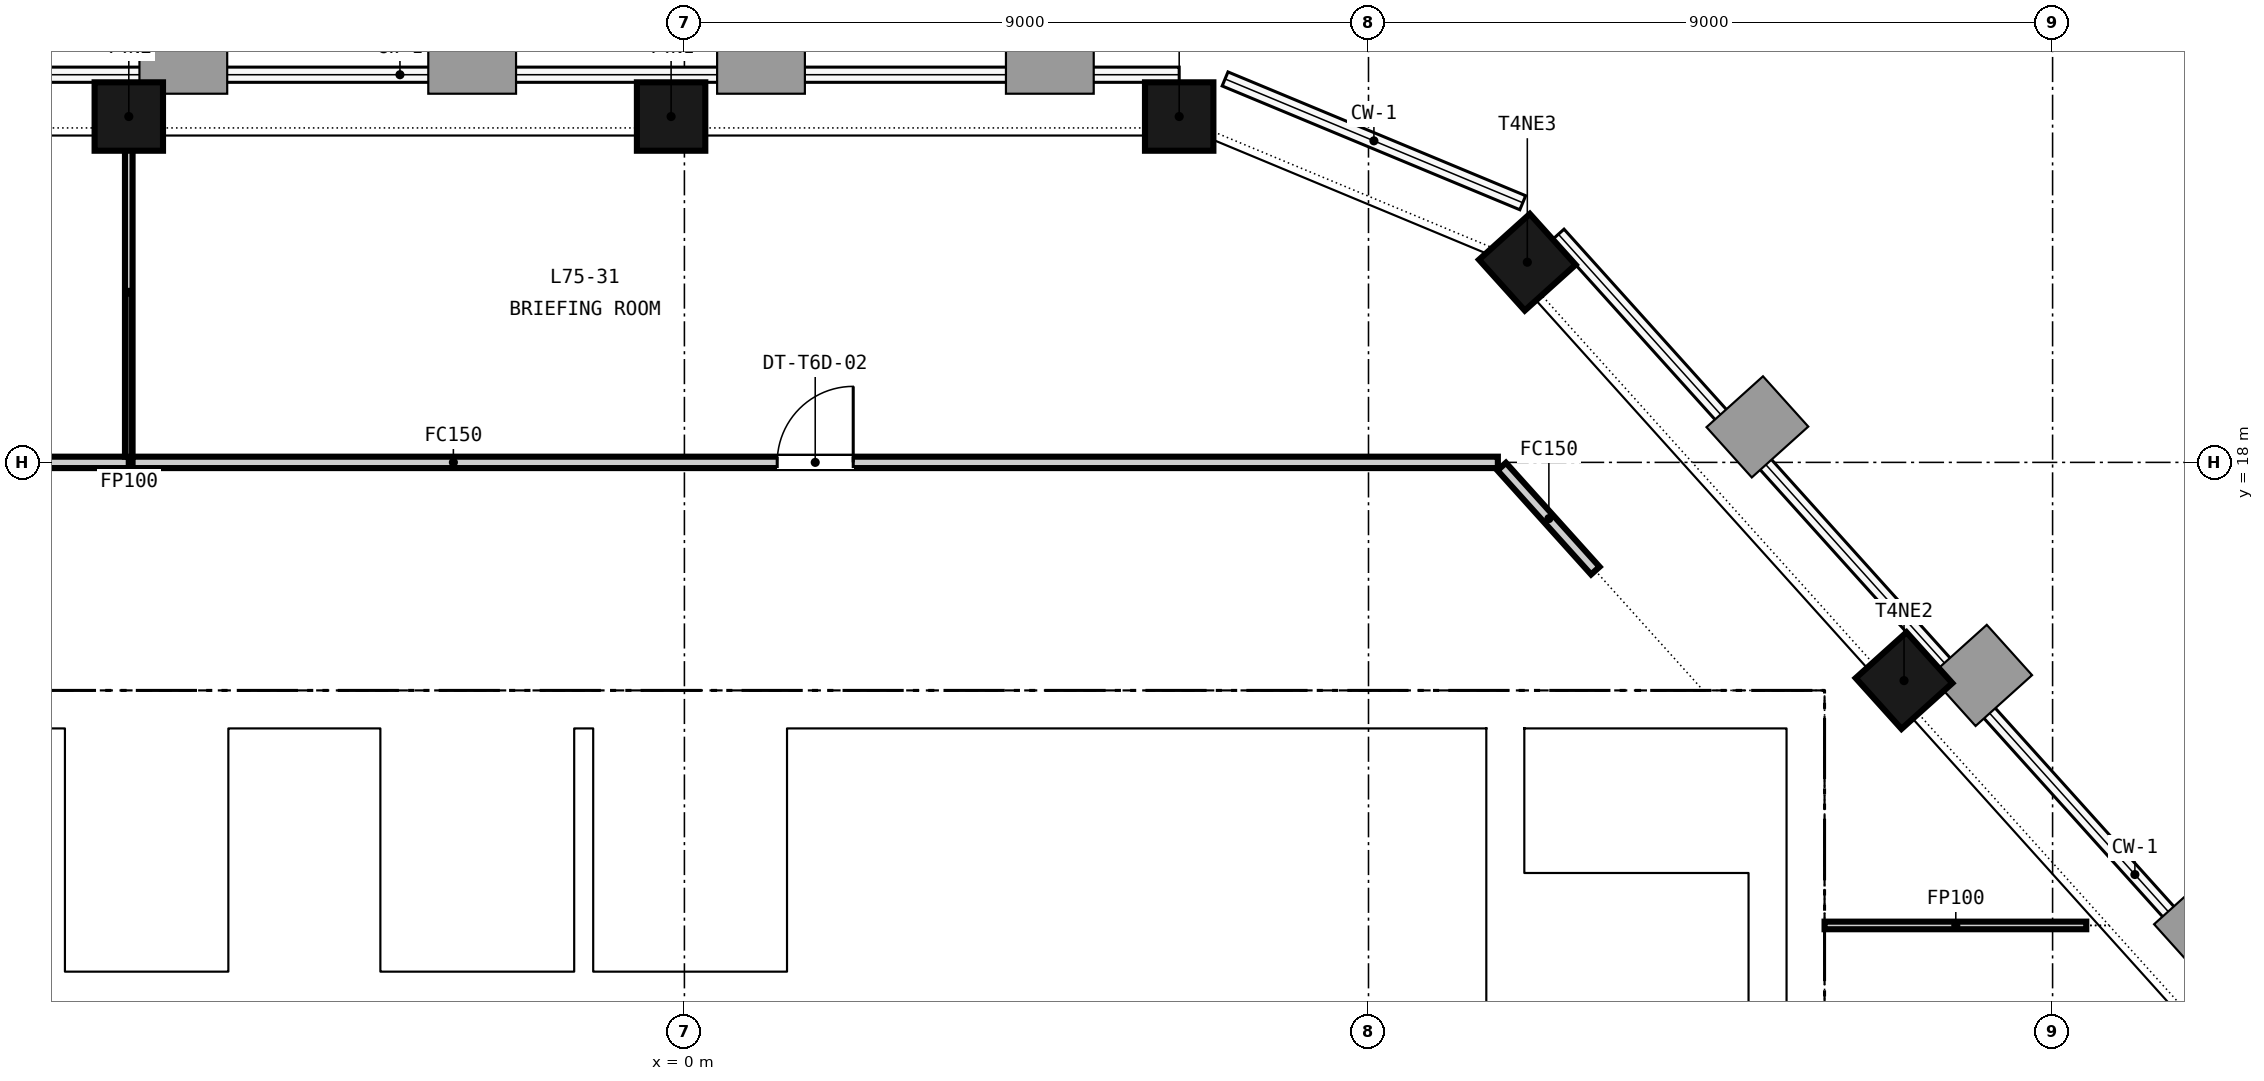
"""IFC4 building model, lengths in metres.
Left out: names, types, materials, properties, quantities, classifications, styles, units other than length and angle.
Written with IfcOpenShell. Run it as: python <this file> out.ifc"""

import sys

from ifc_helpers import new_model, si_unit, direction, frame, frame_2d, origin, origin_2d, place, context, subcontext, project, spatial, rectangle, extrude, element, fill, save


model = new_model("IFC4")
c1 = context("Model", 3, precision=1e-05, world=origin(), true_north=direction((0.0, 1.0)))
c2 = subcontext(c1, "Body", "Model", "MODEL_VIEW")
j1 = project(units=[si_unit("LENGTHUNIT", "METRE"), si_unit("PLANEANGLEUNIT", "RADIAN")], contexts=[c1])
p1 = place(None, origin())
s1 = spatial("IfcSite", under=j1, at=p1, CompositionType="ELEMENT")
p2 = place(p1, origin())
s2 = spatial("IfcBuilding", under=s1, at=p2, CompositionType="ELEMENT")
p3 = place(p2, frame((0.0, 0.0, 293.8)))
s3 = spatial("IfcBuildingStorey", under=s2, at=p3, CompositionType="ELEMENT", Elevation=293.8)
p4 = place(p3, frame((-15.0, 14.75, -0.15), z_axis=(0.0, 0.0, 1.0), x_axis=(1.0, 0.0, 0.0)))
e1 = element("IfcWall", 1, at=p4, inside=s3, PredefinedType="SOLIDWALL", context=c2, shape_type="SweptSolid", body=[
    extrude(rectangle(XDim=30.0, YDim=0.5, at=frame_2d((15.0, 0.0))), origin(), (0.0, 0.0, 1.0), 3.65),
])
p5 = place(p4, frame((9.25, 0.0, 0.15)))
e2 = element("IfcOpeningElement", 2, at=p5, cuts=e1, PredefinedType="OPENING", context=c2, shape_type="SweptSolid", body=[
    extrude(rectangle(XDim=1.5, YDim=2.1, at=frame_2d((0.75, 1.05))), frame((0.0, 0.26, 0.0), z_axis=(0.0, -1.0, 0.0), x_axis=(1.0, 0.0, 0.0)), (0.0, 0.0, 1.0), 0.52),
])
p6 = place(p4, frame((19.4, 0.0, 0.15)))
e3 = element("IfcOpeningElement", 3, at=p6, cuts=e1, PredefinedType="OPENING", context=c2, shape_type="SweptSolid", body=[
    extrude(rectangle(XDim=1.5, YDim=2.1, at=frame_2d((0.75, 1.05))), frame((0.0, 0.26, 0.0), z_axis=(0.0, -1.0, 0.0), x_axis=(1.0, 0.0, 0.0)), (0.0, 0.0, 1.0), 0.52),
])
p7 = place(p4, frame((1.5, 0.0, 0.15)))
e4 = element("IfcOpeningElement", 4, at=p7, cuts=e1, PredefinedType="OPENING", context=c2, shape_type="SweptSolid", body=[
    extrude(rectangle(XDim=1.2, YDim=2.1, at=frame_2d((0.6, 1.05))), frame((0.0, 0.26, 0.0), z_axis=(0.0, -1.0, 0.0), x_axis=(1.0, 0.0, 0.0)), (0.0, 0.0, 1.0), 0.52),
])
p8 = place(p4, frame((27.3, 0.0, 0.15)))
e5 = element("IfcOpeningElement", 5, at=p8, cuts=e1, PredefinedType="OPENING", context=c2, shape_type="SweptSolid", body=[
    extrude(rectangle(XDim=1.2, YDim=2.1, at=frame_2d((0.6, 1.05))), frame((0.0, 0.26, 0.0), z_axis=(0.0, -1.0, 0.0), x_axis=(1.0, 0.0, 0.0)), (0.0, 0.0, 1.0), 0.52),
])
for number, where, z_axis, x_axis in (
    (6, (14.75, 0.5, -0.15), (0.0, 0.0, 1.0), (0.0, 1.0, 0.0)),
    (7, (10.8, 0.5, -0.15), (0.0, 0.0, 1.0), (0.0, 1.0, 0.0)),
):
    element("IfcWall", number, at=place(p3, frame(where, z_axis=z_axis, x_axis=x_axis)), inside=s3, PredefinedType="SOLIDWALL", context=c2, shape_type="SweptSolid", body=[
        extrude(rectangle(XDim=14.0, YDim=0.5, at=frame_2d((7.0, 0.0))), origin(), (0.0, 0.0, 1.0), 3.65),
    ])
for number, where, z_axis, x_axis in (
    (8, (6.51, 22.55, -0.15), (0.0, 0.0, 1.0), (-1.0, 0.0, 0.0)),
    (9, (-0.175, 22.55, -0.15), (0.0, 0.0, 1.0), (-1.0, 0.0, 0.0)),
    (10, (-7.31, 22.55, -0.15), (0.0, 0.0, 1.0), (-1.0, 0.0, 0.0)),
    (11, (16.045, 15.129, -0.15), (0.0, 0.0, 1.0), (-0.669, 0.743, 0.0)),
    (12, (11.089, 20.633, -0.15), (0.0, 0.0, 1.0), (-0.669, 0.743, 0.0)),
):
    element("IfcColumn", number, at=place(p3, frame(where, z_axis=z_axis, x_axis=x_axis)), inside=s3, PredefinedType="COLUMN", context=c2, shape_type="SweptSolid", body=[
        extrude(rectangle(XDim=0.9, YDim=0.9, at=origin_2d()), origin(), (0.0, 0.0, 1.0), 3.65),
    ])
p9 = place(p3, frame((-10.55, 11.2, 0.0), z_axis=(0.0, 0.0, 1.0), x_axis=(1.0, 0.0, 0.0)))
e13 = element("IfcWall", 13, at=p9, inside=s3, PredefinedType="PARTITIONING", context=c2, shape_type="SweptSolid", body=[
    extrude(rectangle(XDim=4.8, YDim=0.2, at=frame_2d((2.4, 0.0))), origin(), (0.0, 0.0, 1.0), 3.5),
])
p10 = place(p9, frame((0.525, 0.0, 0.0)))
e14 = element("IfcOpeningElement", 14, at=p10, cuts=e13, PredefinedType="OPENING", context=c2, shape_type="SweptSolid", body=[
    extrude(rectangle(XDim=1.1, YDim=2.1, at=frame_2d((0.55, 1.05))), frame((0.0, 0.11, 0.0), z_axis=(0.0, -1.0, 0.0), x_axis=(1.0, 0.0, 0.0)), (0.0, 0.0, 1.0), 0.22),
])
p11 = place(p9, frame((2.925, 0.0, 0.0)))
e15 = element("IfcOpeningElement", 15, at=p11, cuts=e13, PredefinedType="OPENING", context=c2, shape_type="SweptSolid", body=[
    extrude(rectangle(XDim=1.1, YDim=2.1, at=frame_2d((0.55, 1.05))), frame((0.0, 0.11, 0.0), z_axis=(0.0, -1.0, 0.0), x_axis=(1.0, 0.0, 0.0)), (0.0, 0.0, 1.0), 0.22),
])
p12 = place(p3, frame((-4.25, 11.2, 0.0), z_axis=(0.0, 0.0, 1.0), x_axis=(1.0, 0.0, 0.0)))
e16 = element("IfcWall", 16, at=p12, inside=s3, PredefinedType="PARTITIONING", context=c2, shape_type="SweptSolid", body=[
    extrude(rectangle(XDim=8.65, YDim=0.2, at=frame_2d((4.325, 0.0))), origin(), (0.0, 0.0, 1.0), 3.5),
])
p13 = place(p12, frame((0.825, 0.0, 0.0)))
e17 = element("IfcOpeningElement", 17, at=p13, cuts=e16, PredefinedType="OPENING", context=c2, shape_type="SweptSolid", body=[
    extrude(rectangle(XDim=1.4, YDim=2.1, at=frame_2d((0.7, 1.05))), frame((0.0, 0.11, 0.0), z_axis=(0.0, -1.0, 0.0), x_axis=(1.0, 0.0, 0.0)), (0.0, 0.0, 1.0), 0.22),
])
p14 = place(p12, frame((3.625, 0.0, 0.0)))
e18 = element("IfcOpeningElement", 18, at=p14, cuts=e16, PredefinedType="OPENING", context=c2, shape_type="SweptSolid", body=[
    extrude(rectangle(XDim=1.4, YDim=2.1, at=frame_2d((0.7, 1.05))), frame((0.0, 0.11, 0.0), z_axis=(0.0, -1.0, 0.0), x_axis=(1.0, 0.0, 0.0)), (0.0, 0.0, 1.0), 0.22),
])
p15 = place(p12, frame((6.625, 0.0, 0.0)))
e19 = element("IfcOpeningElement", 19, at=p15, cuts=e16, PredefinedType="OPENING", context=c2, shape_type="SweptSolid", body=[
    extrude(rectangle(XDim=1.0, YDim=2.1, at=frame_2d((0.5, 1.05))), frame((0.0, 0.11, 0.0), z_axis=(0.0, -1.0, 0.0), x_axis=(1.0, 0.0, 0.0)), (0.0, 0.0, 1.0), 0.22),
])
p16 = place(p3, frame((5.9, 11.2, 0.0), z_axis=(0.0, 0.0, 1.0), x_axis=(1.0, 0.0, 0.0)))
e20 = element("IfcWall", 20, at=p16, inside=s3, PredefinedType="PARTITIONING", context=c2, shape_type="SweptSolid", body=[
    extrude(rectangle(XDim=4.65, YDim=0.2, at=frame_2d((2.325, 0.0))), origin(), (0.0, 0.0, 1.0), 3.5),
])
p17 = place(p16, frame((1.075, 0.0, 0.0)))
e21 = element("IfcOpeningElement", 21, at=p17, cuts=e20, PredefinedType="OPENING", context=c2, shape_type="SweptSolid", body=[
    extrude(rectangle(XDim=0.9, YDim=2.1, at=frame_2d((0.45, 1.05))), frame((0.0, 0.11, 0.0), z_axis=(0.0, -1.0, 0.0), x_axis=(1.0, 0.0, 0.0)), (0.0, 0.0, 1.0), 0.22),
])
p18 = place(p16, frame((3.4, 0.0, 0.0)))
e22 = element("IfcOpeningElement", 22, at=p18, cuts=e20, PredefinedType="OPENING", context=c2, shape_type="SweptSolid", body=[
    extrude(rectangle(XDim=0.9, YDim=2.1, at=frame_2d((0.45, 1.05))), frame((0.0, 0.11, 0.0), z_axis=(0.0, -1.0, 0.0), x_axis=(1.0, 0.0, 0.0)), (0.0, 0.0, 1.0), 0.22),
])
p19 = place(p3, frame((-4.125, 6.15, 0.0), z_axis=(0.0, 0.0, 1.0), x_axis=(0.0, 1.0, 0.0)))
e23 = element("IfcWall", 23, at=p19, inside=s3, PredefinedType="PARTITIONING", context=c2, shape_type="SweptSolid", body=[
    extrude(rectangle(XDim=4.95, YDim=0.25, at=frame_2d((2.475, 0.0))), origin(), (0.0, 0.0, 1.0), 3.5),
])
p20 = place(p19, frame((3.125, 0.0, 0.0)))
e24 = element("IfcOpeningElement", 24, at=p20, cuts=e23, PredefinedType="OPENING", context=c2, shape_type="SweptSolid", body=[
    extrude(rectangle(XDim=1.2, YDim=2.1, at=frame_2d((0.6, 1.05))), frame((0.0, 0.135, 0.0), z_axis=(0.0, -1.0, 0.0), x_axis=(1.0, 0.0, 0.0)), (0.0, 0.0, 1.0), 0.27),
])
for number, where, z_axis, x_axis in (
    (25, (-8.275, 11.3, 0.0), (0.0, 0.0, 1.0), (0.0, 1.0, 0.0)),
    (26, (-5.875, 11.3, 0.0), (0.0, 0.0, 1.0), (0.0, 1.0, 0.0)),
    (27, (-4.125, 11.3, 0.0), (0.0, 0.0, 1.0), (0.0, 1.0, 0.0)),
    (28, (-1.325, 11.3, 0.0), (0.0, 0.0, 1.0), (0.0, 1.0, 0.0)),
    (29, (1.475, 11.3, 0.0), (0.0, 0.0, 1.0), (0.0, 1.0, 0.0)),
    (30, (4.275, 11.3, 0.0), (0.0, 0.0, 1.0), (0.0, 1.0, 0.0)),
    (31, (6.025, 11.3, 0.0), (0.0, 0.0, 1.0), (0.0, 1.0, 0.0)),
    (32, (8.825, 11.3, 0.0), (0.0, 0.0, 1.0), (0.0, 1.0, 0.0)),
):
    element("IfcWall", number, at=place(p3, frame(where, z_axis=z_axis, x_axis=x_axis)), inside=s3, PredefinedType="PARTITIONING", context=c2, shape_type="SweptSolid", body=[
        extrude(rectangle(XDim=3.2, YDim=0.25, at=frame_2d((1.6, 0.0))), origin(), (0.0, 0.0, 1.0), 3.5),
    ])
p21 = place(p3, frame((14.25, 0.5, 0.0), z_axis=(0.0, 0.0, 1.0), x_axis=(0.0, 1.0, 0.0)))
e33 = element("IfcWall", 33, at=p21, inside=s3, PredefinedType="SOLIDWALL", context=c2, shape_type="SweptSolid", body=[
    extrude(rectangle(XDim=14.0, YDim=0.5, at=frame_2d((7.0, 0.0))), origin(), (0.0, 0.0, 1.0), 3.5),
])
p22 = place(p3, frame((-15.103, 18.0, 0.0), z_axis=(0.0, 0.0, 1.0), x_axis=(1.0, 0.0, 0.0)))
e34 = element("IfcWall", 34, at=p22, inside=s3, PredefinedType="PARTITIONING", context=c2, shape_type="SweptSolid", body=[
    extrude(rectangle(XDim=7.793, YDim=0.15, at=frame_2d((3.896, 0.0))), origin(), (0.0, 0.0, 1.0), 2.751),
])
p23 = place(p22, frame((3.396, 0.0, 0.0)))
e35 = element("IfcOpeningElement", 35, at=p23, cuts=e34, PredefinedType="OPENING", context=c2, shape_type="SweptSolid", body=[
    extrude(rectangle(XDim=1.0, YDim=2.1, at=frame_2d((0.5, 1.05))), frame((0.0, 0.085, 0.0), z_axis=(0.0, -1.0, 0.0), x_axis=(1.0, 0.0, 0.0)), (0.0, 0.0, 1.0), 0.17),
])
p24 = place(p3, frame((-7.31, 18.075, 0.0), z_axis=(0.0, 0.0, 1.0), x_axis=(0.0, 1.0, 0.0)))
e36 = element("IfcWall", 36, at=p24, inside=s3, PredefinedType="PARTITIONING", context=c2, shape_type="SweptSolid", body=[
    extrude(rectangle(XDim=4.325, YDim=0.1, at=frame_2d((2.163, 0.0))), origin(), (0.0, 0.0, 1.0), 2.751),
])
p25 = place(p3, frame((-7.26, 18.0, 0.0), z_axis=(0.0, 0.0, 1.0), x_axis=(1.0, 0.0, 0.0)))
e37 = element("IfcWall", 37, at=p25, inside=s3, PredefinedType="PARTITIONING", context=c2, shape_type="SweptSolid", body=[
    extrude(rectangle(XDim=17.962, YDim=0.15, at=frame_2d((8.981, 0.0))), origin(), (0.0, 0.0, 1.0), 2.751),
])
p26 = place(p25, frame((8.481, 0.0, 0.0)))
e38 = element("IfcOpeningElement", 38, at=p26, cuts=e37, PredefinedType="OPENING", context=c2, shape_type="SweptSolid", body=[
    extrude(rectangle(XDim=1.0, YDim=2.1, at=frame_2d((0.5, 1.05))), frame((0.0, 0.085, 0.0), z_axis=(0.0, -1.0, 0.0), x_axis=(1.0, 0.0, 0.0)), (0.0, 0.0, 1.0), 0.17),
])
p27 = place(p3, frame((10.752, 17.944, 0.0), z_axis=(0.0, 0.0, 1.0), x_axis=(0.669074609711, -0.743195241266, 0.0)))
e39 = element("IfcWall", 39, at=p27, inside=s3, PredefinedType="PARTITIONING", context=c2, shape_type="SweptSolid", body=[
    extrude(rectangle(XDim=1.841, YDim=0.15, at=frame_2d((0.921, 0.0))), origin(), (0.0, 0.0, 1.0), 2.751),
])
p28 = place(p3, frame((15.0, 11.908, 0.0), z_axis=(0.0, 0.0, 1.0), x_axis=(1.0, 0.0, 0.0)))
e40 = element("IfcWall", 40, at=p28, inside=s3, PredefinedType="PARTITIONING", context=c2, shape_type="SweptSolid", body=[
    extrude(rectangle(XDim=3.443, YDim=0.1, at=frame_2d((1.722, 0.0))), origin(), (0.0, 0.0, 1.0), 2.751),
])
p29 = place(p11, origin())
e41 = element("IfcDoor", 41, at=p29, inside=s3, OperationType="DOUBLE_DOOR_SLIDING", PredefinedType="DOOR", context=c2, shape_type="SweptSolid", body=[
    extrude(rectangle(XDim=1.1, YDim=2.1, at=frame_2d((0.55, 1.05))), frame((0.0, 0.025, 0.0), z_axis=(0.0, -1.0, 0.0), x_axis=(1.0, 0.0, 0.0)), (0.0, 0.0, 1.0), 0.05),
])
fill(e15, e41)
p30 = place(p13, origin())
e42 = element("IfcDoor", 42, at=p30, inside=s3, OperationType="DOUBLE_DOOR_SLIDING", PredefinedType="DOOR", context=c2, shape_type="SweptSolid", body=[
    extrude(rectangle(XDim=1.4, YDim=2.1, at=frame_2d((0.7, 1.05))), frame((0.0, 0.025, 0.0), z_axis=(0.0, -1.0, 0.0), x_axis=(1.0, 0.0, 0.0)), (0.0, 0.0, 1.0), 0.05),
])
fill(e17, e42)
p31 = place(p14, origin())
e43 = element("IfcDoor", 43, at=p31, inside=s3, OperationType="DOUBLE_DOOR_SLIDING", PredefinedType="DOOR", context=c2, shape_type="SweptSolid", body=[
    extrude(rectangle(XDim=1.4, YDim=2.1, at=frame_2d((0.7, 1.05))), frame((0.0, 0.025, 0.0), z_axis=(0.0, -1.0, 0.0), x_axis=(1.0, 0.0, 0.0)), (0.0, 0.0, 1.0), 0.05),
])
fill(e18, e43)
p32 = place(p15, origin())
e44 = element("IfcDoor", 44, at=p32, inside=s3, OperationType="SINGLE_SWING_LEFT", PredefinedType="DOOR", context=c2, shape_type="SweptSolid", body=[
    extrude(rectangle(XDim=1.0, YDim=2.1, at=frame_2d((0.5, 1.05))), frame((0.0, 0.025, 0.0), z_axis=(0.0, -1.0, 0.0), x_axis=(1.0, 0.0, 0.0)), (0.0, 0.0, 1.0), 0.05),
])
fill(e19, e44)
p33 = place(p17, origin())
e45 = element("IfcDoor", 45, at=p33, inside=s3, OperationType="SINGLE_SWING_RIGHT", PredefinedType="DOOR", context=c2, shape_type="SweptSolid", body=[
    extrude(rectangle(XDim=0.9, YDim=2.1, at=frame_2d((0.45, 1.05))), frame((0.0, 0.025, 0.0), z_axis=(0.0, -1.0, 0.0), x_axis=(1.0, 0.0, 0.0)), (0.0, 0.0, 1.0), 0.05),
])
fill(e21, e45)
p34 = place(p18, origin())
e46 = element("IfcDoor", 46, at=p34, inside=s3, OperationType="SINGLE_SWING_LEFT", PredefinedType="DOOR", context=c2, shape_type="SweptSolid", body=[
    extrude(rectangle(XDim=0.9, YDim=2.1, at=frame_2d((0.45, 1.05))), frame((0.0, 0.025, 0.0), z_axis=(0.0, -1.0, 0.0), x_axis=(1.0, 0.0, 0.0)), (0.0, 0.0, 1.0), 0.05),
])
fill(e22, e46)
p35 = place(p5, origin())
e47 = element("IfcDoor", 47, at=p35, inside=s3, OperationType="DOUBLE_DOOR_SINGLE_SWING", PredefinedType="DOOR", context=c2, shape_type="SweptSolid", body=[
    extrude(rectangle(XDim=1.5, YDim=2.1, at=frame_2d((0.75, 1.05))), frame((0.0, 0.025, 0.0), z_axis=(0.0, -1.0, 0.0), x_axis=(1.0, 0.0, 0.0)), (0.0, 0.0, 1.0), 0.05),
])
fill(e2, e47)
p36 = place(p6, origin())
e48 = element("IfcDoor", 48, at=p36, inside=s3, OperationType="DOUBLE_DOOR_SINGLE_SWING", PredefinedType="DOOR", context=c2, shape_type="SweptSolid", body=[
    extrude(rectangle(XDim=1.5, YDim=2.1, at=frame_2d((0.75, 1.05))), frame((0.0, 0.025, 0.0), z_axis=(0.0, -1.0, 0.0), x_axis=(1.0, 0.0, 0.0)), (0.0, 0.0, 1.0), 0.05),
])
fill(e3, e48)
p37 = place(p8, origin())
e49 = element("IfcDoor", 49, at=p37, inside=s3, OperationType="SINGLE_SWING_LEFT", PredefinedType="DOOR", context=c2, shape_type="SweptSolid", body=[
    extrude(rectangle(XDim=1.2, YDim=2.1, at=frame_2d((0.6, 1.05))), frame((0.0, 0.025, 0.0), z_axis=(0.0, -1.0, 0.0), x_axis=(1.0, 0.0, 0.0)), (0.0, 0.0, 1.0), 0.05),
])
fill(e5, e49)
p38 = place(p26, origin())
e50 = element("IfcDoor", 50, at=p38, inside=s3, OperationType="SINGLE_SWING_RIGHT", PredefinedType="DOOR", context=c2, shape_type="SweptSolid", body=[
    extrude(rectangle(XDim=1.0, YDim=2.1, at=frame_2d((0.5, 1.05))), frame((0.0, 0.025, 0.0), z_axis=(0.0, -1.0, 0.0), x_axis=(1.0, 0.0, 0.0)), (0.0, 0.0, 1.0), 0.05),
])
fill(e38, e50)
save(model, sys.argv[1])
